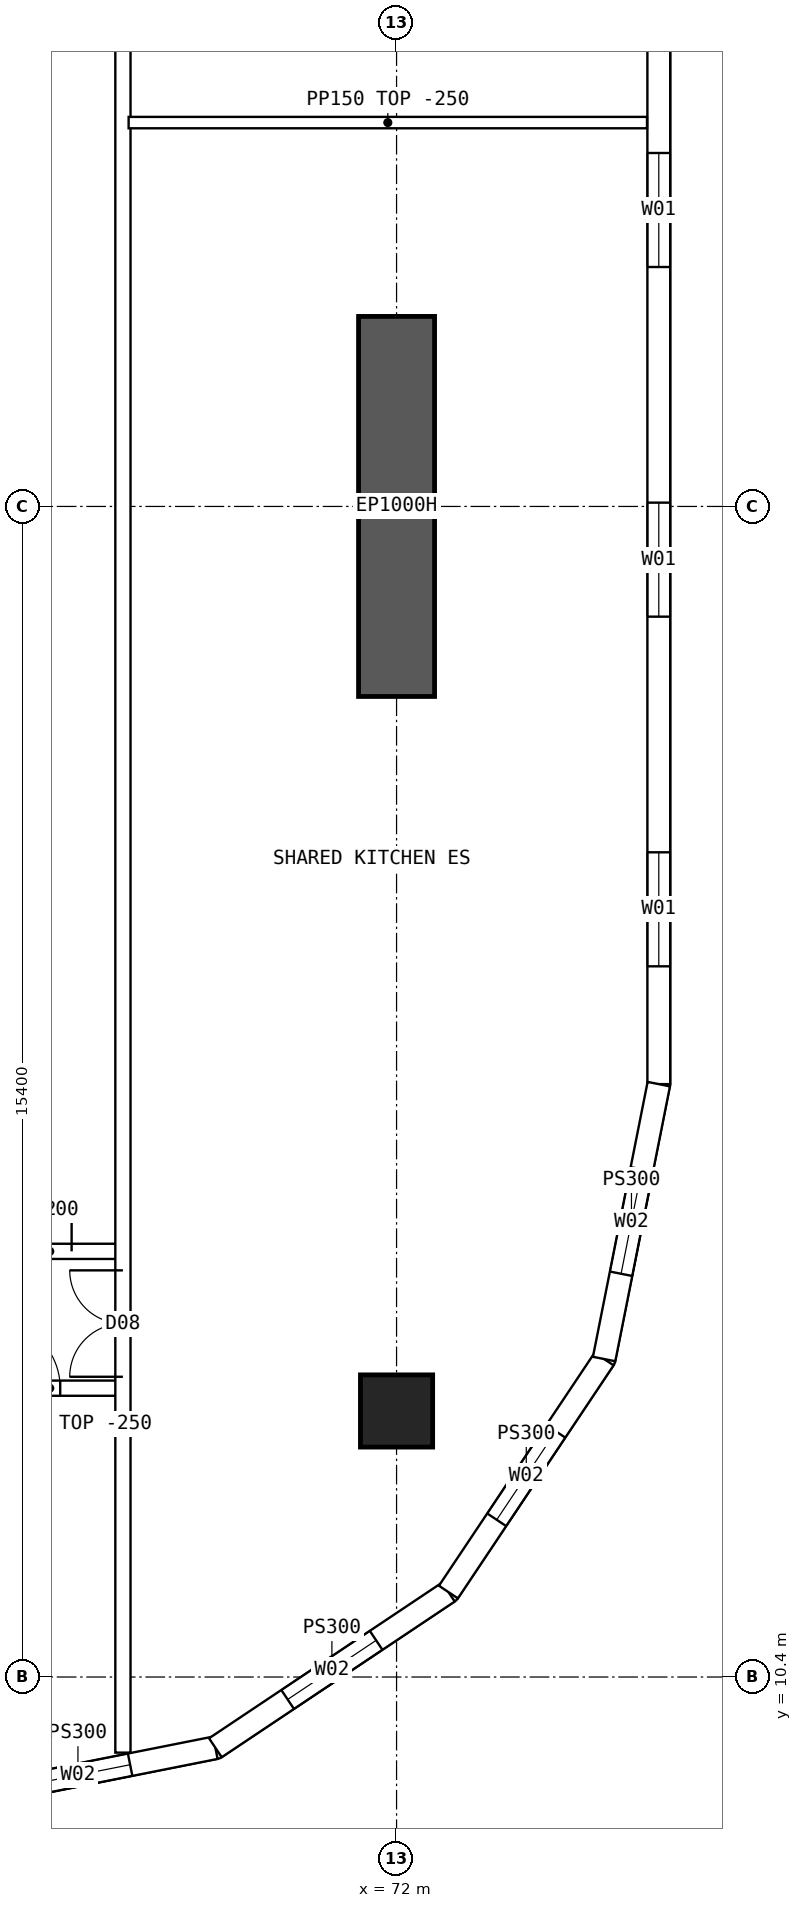
"""IFC4 building model, lengths in metres.
Left out: names, types, materials, properties, quantities, classifications, styles, units other than length and angle.
Written with IfcOpenShell. Run it as: python <this file> out.ifc"""

import sys

from ifc_helpers import new_model, si_unit, direction, frame, frame_2d, origin, origin_2d, place, context, subcontext, project, spatial, polyline, rectangle, hollow_rectangle, outline, extrude, element, fill, save


model = new_model("IFC4")
c1 = context("Model", 3, precision=1e-05, world=origin(), true_north=direction((0.0, 1.0)))
c2 = subcontext(c1, "Body", "Model", "MODEL_VIEW")
j1 = project(units=[si_unit("LENGTHUNIT", "METRE"), si_unit("PLANEANGLEUNIT", "RADIAN")], contexts=[c1])
p1 = place(None, origin())
s1 = spatial("IfcSite", under=j1, at=p1, CompositionType="ELEMENT")
p2 = place(p1, origin())
s2 = spatial("IfcBuilding", under=s1, at=p2, CompositionType="ELEMENT")
p3 = place(p2, frame((0.0, 0.0, 106.9)))
s3 = spatial("IfcBuildingStorey", under=s2, at=p3, CompositionType="ELEMENT", Elevation=106.9)
p4 = place(p3, frame((72.0, 13.9, 0.0), z_axis=(0.0, 0.0, 1.0), x_axis=(1.0, 0.0, 0.0)))
e1 = element("IfcColumn", 1, at=p4, inside=s3, PredefinedType="COLUMN", context=c2, shape_type="SweptSolid", body=[
    extrude(hollow_rectangle(XDim=0.95, YDim=0.95, WallThickness=0.095, at=origin_2d()), origin(), (0.0, 0.0, 1.0), 3.75),
])
p5 = place(p3, frame((72.0, 23.3, 0.0), z_axis=(0.0, 0.0, 1.0), x_axis=(0.0, 1.0, 0.0)))
e2 = element("IfcWall", 2, at=p5, inside=s3, PredefinedType="SHEAR", context=c2, shape_type="SweptSolid", body=[
    extrude(rectangle(XDim=5.0, YDim=1.0, at=frame_2d((2.5, 0.0))), origin(), (0.0, 0.0, 1.0), 3.75),
])
p6 = place(p3, frame((75.45, 18.2, 0.0), z_axis=(0.0, 0.0, 1.0), x_axis=(0.0, 1.0, 0.0)))
e3 = element("IfcWall", 3, at=p6, inside=s3, PredefinedType="SOLIDWALL", context=c2, shape_type="SweptSolid", body=[
    extrude(outline(polyline([(-0.015, -0.15), (27.615, -0.15), (27.585, 0.15), (0.015, 0.15), (-0.015, -0.15)])), origin(), (0.0, 0.0, 1.0), 3.5),
])
p7 = place(p6, frame((1.55, 0.0, 0.9)))
e4 = element("IfcOpeningElement", 4, at=p7, cuts=e3, PredefinedType="OPENING", context=c2, shape_type="SweptSolid", body=[
    extrude(rectangle(XDim=1.5, YDim=2.0, at=frame_2d((0.75, 1.0))), frame((0.0, 0.16, 0.0), z_axis=(0.0, -1.0, 0.0), x_axis=(1.0, 0.0, 0.0)), (0.0, 0.0, 1.0), 0.32),
])
p8 = place(p6, frame((6.15, 0.0, 0.9)))
e5 = element("IfcOpeningElement", 5, at=p8, cuts=e3, PredefinedType="OPENING", context=c2, shape_type="SweptSolid", body=[
    extrude(rectangle(XDim=1.5, YDim=2.0, at=frame_2d((0.75, 1.0))), frame((0.0, 0.16, 0.0), z_axis=(0.0, -1.0, 0.0), x_axis=(1.0, 0.0, 0.0)), (0.0, 0.0, 1.0), 0.32),
])
p9 = place(p6, frame((10.75, 0.0, 0.9)))
e6 = element("IfcOpeningElement", 6, at=p9, cuts=e3, PredefinedType="OPENING", context=c2, shape_type="SweptSolid", body=[
    extrude(rectangle(XDim=1.5, YDim=2.0, at=frame_2d((0.75, 1.0))), frame((0.0, 0.16, 0.0), z_axis=(0.0, -1.0, 0.0), x_axis=(1.0, 0.0, 0.0)), (0.0, 0.0, 1.0), 0.32),
])
p10 = place(p6, frame((15.35, 0.0, 0.9)))
e7 = element("IfcOpeningElement", 7, at=p10, cuts=e3, PredefinedType="OPENING", context=c2, shape_type="SweptSolid", body=[
    extrude(rectangle(XDim=1.5, YDim=2.0, at=frame_2d((0.75, 1.0))), frame((0.0, 0.16, 0.0), z_axis=(0.0, -1.0, 0.0), x_axis=(1.0, 0.0, 0.0)), (0.0, 0.0, 1.0), 0.32),
])
p11 = place(p6, frame((19.95, 0.0, 0.9)))
e8 = element("IfcOpeningElement", 8, at=p11, cuts=e3, PredefinedType="OPENING", context=c2, shape_type="SweptSolid", body=[
    extrude(rectangle(XDim=1.5, YDim=2.0, at=frame_2d((0.75, 1.0))), frame((0.0, 0.16, 0.0), z_axis=(0.0, -1.0, 0.0), x_axis=(1.0, 0.0, 0.0)), (0.0, 0.0, 1.0), 0.32),
])
p12 = place(p6, frame((24.55, 0.0, 0.9)))
e9 = element("IfcOpeningElement", 9, at=p12, cuts=e3, PredefinedType="OPENING", context=c2, shape_type="SweptSolid", body=[
    extrude(rectangle(XDim=1.5, YDim=2.0, at=frame_2d((0.75, 1.0))), frame((0.0, 0.16, 0.0), z_axis=(0.0, -1.0, 0.0), x_axis=(1.0, 0.0, 0.0)), (0.0, 0.0, 1.0), 0.32),
])
p13 = place(p3, frame((66.0, 8.75, 0.0), z_axis=(0.0, 0.0, 1.0), x_axis=(0.980791473772, 0.195059183267, 0.0)))
e10 = element("IfcWall", 10, at=p13, inside=s3, PredefinedType="SOLIDWALL", context=c2, shape_type="SweptSolid", body=[
    extrude(outline(polyline([(-0.03, -0.15), (3.717, -0.15), (3.657, 0.15), (0.03, 0.15), (-0.03, -0.15)])), origin(), (0.0, 0.0, 1.0), 3.5),
])
p14 = place(p13, frame((1.144, 0.0, 0.9)))
e11 = element("IfcOpeningElement", 11, at=p14, cuts=e10, PredefinedType="OPENING", context=c2, shape_type="SweptSolid", body=[
    extrude(rectangle(XDim=1.4, YDim=1.8, at=frame_2d((0.7, 0.9))), frame((0.0, 0.16, 0.0), z_axis=(0.0, -1.0, 0.0), x_axis=(1.0, 0.0, 0.0)), (0.0, 0.0, 1.0), 0.32),
])
p15 = place(p3, frame((69.616, 9.469, 0.0), z_axis=(0.0, 0.0, 1.0), x_axis=(0.831448786846, 0.555601399253, 0.0)))
e12 = element("IfcWall", 12, at=p15, inside=s3, PredefinedType="SOLIDWALL", context=c2, shape_type="SweptSolid", body=[
    extrude(outline(polyline([(-0.03, -0.15), (3.717, -0.15), (3.657, 0.15), (0.03, 0.15), (-0.03, -0.15)])), origin(), (0.0, 0.0, 1.0), 3.5),
])
p16 = place(p15, frame((1.144, 0.0, 0.9)))
e13 = element("IfcOpeningElement", 13, at=p16, cuts=e12, PredefinedType="OPENING", context=c2, shape_type="SweptSolid", body=[
    extrude(rectangle(XDim=1.4, YDim=1.8, at=frame_2d((0.7, 0.9))), frame((0.0, 0.16, 0.0), z_axis=(0.0, -1.0, 0.0), x_axis=(1.0, 0.0, 0.0)), (0.0, 0.0, 1.0), 0.32),
])
p17 = place(p3, frame((72.682, 11.518, 0.0), z_axis=(0.0, 0.0, 1.0), x_axis=(0.555601399253, 0.831448786846, 0.0)))
e14 = element("IfcWall", 14, at=p17, inside=s3, PredefinedType="SOLIDWALL", context=c2, shape_type="SweptSolid", body=[
    extrude(outline(polyline([(-0.03, -0.15), (3.717, -0.15), (3.657, 0.15), (0.03, 0.15), (-0.03, -0.15)])), origin(), (0.0, 0.0, 1.0), 3.5),
])
p18 = place(p17, frame((1.144, 0.0, 0.9)))
e15 = element("IfcOpeningElement", 15, at=p18, cuts=e14, PredefinedType="OPENING", context=c2, shape_type="SweptSolid", body=[
    extrude(rectangle(XDim=1.4, YDim=1.8, at=frame_2d((0.7, 0.9))), frame((0.0, 0.16, 0.0), z_axis=(0.0, -1.0, 0.0), x_axis=(1.0, 0.0, 0.0)), (0.0, 0.0, 1.0), 0.32),
])
p19 = place(p3, frame((74.731, 14.583, 0.0), z_axis=(0.0, 0.0, 1.0), x_axis=(0.195059183267, 0.980791473772, 0.0)))
e16 = element("IfcWall", 16, at=p19, inside=s3, PredefinedType="SOLIDWALL", context=c2, shape_type="SweptSolid", body=[
    extrude(outline(polyline([(-0.03, -0.15), (3.702, -0.15), (3.672, 0.15), (0.03, 0.15), (-0.03, -0.15)])), origin(), (0.0, 0.0, 1.0), 3.5),
])
p20 = place(p19, frame((1.144, 0.0, 0.9)))
e17 = element("IfcOpeningElement", 17, at=p20, cuts=e16, PredefinedType="OPENING", context=c2, shape_type="SweptSolid", body=[
    extrude(rectangle(XDim=1.4, YDim=1.8, at=frame_2d((0.7, 0.9))), frame((0.0, 0.16, 0.0), z_axis=(0.0, -1.0, 0.0), x_axis=(1.0, 0.0, 0.0)), (0.0, 0.0, 1.0), 0.32),
])
p21 = place(p3, frame((66.475, 14.2, 0.0), z_axis=(0.0, 0.0, 1.0), x_axis=(1.0, 0.0, 0.0)))
e18 = element("IfcWall", 18, at=p21, inside=s3, PredefinedType="SOLIDWALL", context=c2, shape_type="SweptSolid", body=[
    extrude(rectangle(XDim=1.925, YDim=0.2, at=frame_2d((0.962, 0.0))), origin(), (0.0, 0.0, 1.0), 3.5),
])
p22 = place(p21, frame((0.2, 0.0, 0.0)))
e19 = element("IfcOpeningElement", 19, at=p22, cuts=e18, PredefinedType="OPENING", context=c2, shape_type="SweptSolid", body=[
    extrude(rectangle(XDim=0.9, YDim=2.1, at=frame_2d((0.45, 1.05))), frame((0.0, 0.11, 0.0), z_axis=(0.0, -1.0, 0.0), x_axis=(1.0, 0.0, 0.0)), (0.0, 0.0, 1.0), 0.22),
])
p23 = place(p3, frame((66.475, 16.0, 0.0), z_axis=(0.0, 0.0, 1.0), x_axis=(1.0, 0.0, 0.0)))
e20 = element("IfcWall", 20, at=p23, inside=s3, PredefinedType="SOLIDWALL", context=c2, shape_type="SweptSolid", body=[
    extrude(rectangle(XDim=1.925, YDim=0.2, at=frame_2d((0.962, 0.0))), origin(), (0.0, 0.0, 1.0), 3.5),
])
p24 = place(p23, frame((0.05, 0.0, 0.0)))
e21 = element("IfcOpeningElement", 21, at=p24, cuts=e20, PredefinedType="OPENING", context=c2, shape_type="SweptSolid", body=[
    extrude(rectangle(XDim=1.2, YDim=2.1, at=frame_2d((0.6, 1.05))), frame((0.0, 0.11, 0.0), z_axis=(0.0, -1.0, 0.0), x_axis=(1.0, 0.0, 0.0)), (0.0, 0.0, 1.0), 0.22),
])
p25 = place(p3, frame((68.475, 30.85, 0.0), z_axis=(0.0, 0.0, 1.0), x_axis=(1.0, 0.0, 0.0)))
e22 = element("IfcWall", 22, at=p25, inside=s3, PredefinedType="PARTITIONING", context=c2, shape_type="SweptSolid", body=[
    extrude(outline(polyline([(0.0, 0.0), (6.82, 0.0), (6.82, 3.5), (3.827, 3.5), (3.825, 3.05), (3.227, 3.05), (3.225, 3.5), (0.0, 3.5), (0.0, 0.0)])), frame((0.0, 0.075, 0.0), z_axis=(0.0, -1.0, 0.0), x_axis=(1.0, 0.0, 0.0)), (0.0, 0.0, 1.0), 0.15),
])
p26 = place(p3, frame((68.4, 9.405, 0.0), z_axis=(0.0, 0.0, 1.0), x_axis=(0.0, 1.0, 0.0)))
e23 = element("IfcWall", 23, at=p26, inside=s3, PredefinedType="SOLIDWALL", context=c2, shape_type="SweptSolid", body=[
    extrude(rectangle(XDim=45.189, YDim=0.2, at=frame_2d((22.595, 0.0))), origin(), (0.0, 0.0, 1.0), 3.5),
])
p27 = place(p26, frame((25.595, 0.0, 0.0)))
e24 = element("IfcOpeningElement", 24, at=p27, cuts=e23, PredefinedType="OPENING", context=c2, shape_type="SweptSolid", body=[
    extrude(rectangle(XDim=1.2, YDim=2.1, at=frame_2d((0.6, 1.05))), frame((0.0, 0.11, 0.0), z_axis=(0.0, -1.0, 0.0), x_axis=(1.0, 0.0, 0.0)), (0.0, 0.0, 1.0), 0.22),
])
p28 = place(p26, frame((4.945, 0.0, 0.0)))
e25 = element("IfcOpeningElement", 25, at=p28, cuts=e23, PredefinedType="OPENING", context=c2, shape_type="SweptSolid", body=[
    extrude(rectangle(XDim=1.4, YDim=2.1, at=frame_2d((0.7, 1.05))), frame((0.0, 0.11, 0.0), z_axis=(0.0, -1.0, 0.0), x_axis=(1.0, 0.0, 0.0)), (0.0, 0.0, 1.0), 0.22),
])
p29 = place(p26, frame((38.745, 0.0, 0.0)))
e26 = element("IfcOpeningElement", 26, at=p29, cuts=e23, PredefinedType="OPENING", context=c2, shape_type="SweptSolid", body=[
    extrude(rectangle(XDim=1.4, YDim=2.1, at=frame_2d((0.7, 1.05))), frame((0.0, 0.11, 0.0), z_axis=(0.0, -1.0, 0.0), x_axis=(1.0, 0.0, 0.0)), (0.0, 0.0, 1.0), 0.22),
])
p30 = place(p7, origin())
e27 = element("IfcWindow", 27, at=p30, inside=s3, PartitioningType="SINGLE_PANEL", PredefinedType="WINDOW", context=c2, shape_type="SweptSolid", body=[
    extrude(rectangle(XDim=1.5, YDim=2.0, at=frame_2d((0.75, 1.0))), frame((0.0, 0.03, 0.0), z_axis=(0.0, -1.0, 0.0), x_axis=(1.0, 0.0, 0.0)), (0.0, 0.0, 1.0), 0.06),
])
fill(e4, e27)
p31 = place(p8, origin())
e28 = element("IfcWindow", 28, at=p31, inside=s3, PartitioningType="SINGLE_PANEL", PredefinedType="WINDOW", context=c2, shape_type="SweptSolid", body=[
    extrude(rectangle(XDim=1.5, YDim=2.0, at=frame_2d((0.75, 1.0))), frame((0.0, 0.03, 0.0), z_axis=(0.0, -1.0, 0.0), x_axis=(1.0, 0.0, 0.0)), (0.0, 0.0, 1.0), 0.06),
])
fill(e5, e28)
p32 = place(p9, origin())
e29 = element("IfcWindow", 29, at=p32, inside=s3, PartitioningType="SINGLE_PANEL", PredefinedType="WINDOW", context=c2, shape_type="SweptSolid", body=[
    extrude(rectangle(XDim=1.5, YDim=2.0, at=frame_2d((0.75, 1.0))), frame((0.0, 0.03, 0.0), z_axis=(0.0, -1.0, 0.0), x_axis=(1.0, 0.0, 0.0)), (0.0, 0.0, 1.0), 0.06),
])
fill(e6, e29)
p33 = place(p14, origin())
e30 = element("IfcWindow", 30, at=p33, inside=s3, PartitioningType="SINGLE_PANEL", PredefinedType="WINDOW", context=c2, shape_type="SweptSolid", body=[
    extrude(rectangle(XDim=1.4, YDim=1.8, at=frame_2d((0.7, 0.9))), frame((0.0, 0.03, 0.0), z_axis=(0.0, -1.0, 0.0), x_axis=(1.0, 0.0, 0.0)), (0.0, 0.0, 1.0), 0.06),
])
fill(e11, e30)
p34 = place(p16, origin())
e31 = element("IfcWindow", 31, at=p34, inside=s3, PartitioningType="SINGLE_PANEL", PredefinedType="WINDOW", context=c2, shape_type="SweptSolid", body=[
    extrude(rectangle(XDim=1.4, YDim=1.8, at=frame_2d((0.7, 0.9))), frame((0.0, 0.03, 0.0), z_axis=(0.0, -1.0, 0.0), x_axis=(1.0, 0.0, 0.0)), (0.0, 0.0, 1.0), 0.06),
])
fill(e13, e31)
p35 = place(p18, origin())
e32 = element("IfcWindow", 32, at=p35, inside=s3, PartitioningType="SINGLE_PANEL", PredefinedType="WINDOW", context=c2, shape_type="SweptSolid", body=[
    extrude(rectangle(XDim=1.4, YDim=1.8, at=frame_2d((0.7, 0.9))), frame((0.0, 0.03, 0.0), z_axis=(0.0, -1.0, 0.0), x_axis=(1.0, 0.0, 0.0)), (0.0, 0.0, 1.0), 0.06),
])
fill(e15, e32)
p36 = place(p20, origin())
e33 = element("IfcWindow", 33, at=p36, inside=s3, PartitioningType="SINGLE_PANEL", PredefinedType="WINDOW", context=c2, shape_type="SweptSolid", body=[
    extrude(rectangle(XDim=1.4, YDim=1.8, at=frame_2d((0.7, 0.9))), frame((0.0, 0.03, 0.0), z_axis=(0.0, -1.0, 0.0), x_axis=(1.0, 0.0, 0.0)), (0.0, 0.0, 1.0), 0.06),
])
fill(e17, e33)
p37 = place(p24, origin())
e34 = element("IfcDoor", 34, at=p37, inside=s3, OperationType="DOUBLE_DOOR_SINGLE_SWING", PredefinedType="DOOR", context=c2, shape_type="SweptSolid", body=[
    extrude(rectangle(XDim=1.2, YDim=2.1, at=frame_2d((0.6, 1.05))), frame((0.0, 0.025, 0.0), z_axis=(0.0, -1.0, 0.0), x_axis=(1.0, 0.0, 0.0)), (0.0, 0.0, 1.0), 0.05),
])
fill(e21, e34)
p38 = place(p28, origin())
e35 = element("IfcDoor", 35, at=p38, inside=s3, OperationType="DOUBLE_DOOR_SINGLE_SWING", PredefinedType="DOOR", context=c2, shape_type="SweptSolid", body=[
    extrude(rectangle(XDim=1.4, YDim=2.1, at=frame_2d((0.7, 1.05))), frame((0.0, 0.025, 0.0), z_axis=(0.0, -1.0, 0.0), x_axis=(1.0, 0.0, 0.0)), (0.0, 0.0, 1.0), 0.05),
])
fill(e25, e35)
p39 = place(p22, origin())
e36 = element("IfcDoor", 36, at=p39, inside=s3, OperationType="SINGLE_SWING_LEFT", PredefinedType="DOOR", context=c2, shape_type="SweptSolid", body=[
    extrude(rectangle(XDim=0.9, YDim=2.1, at=frame_2d((0.45, 1.05))), frame((0.0, 0.025, 0.0), z_axis=(0.0, -1.0, 0.0), x_axis=(1.0, 0.0, 0.0)), (0.0, 0.0, 1.0), 0.05),
])
fill(e19, e36)
save(model, sys.argv[1])
